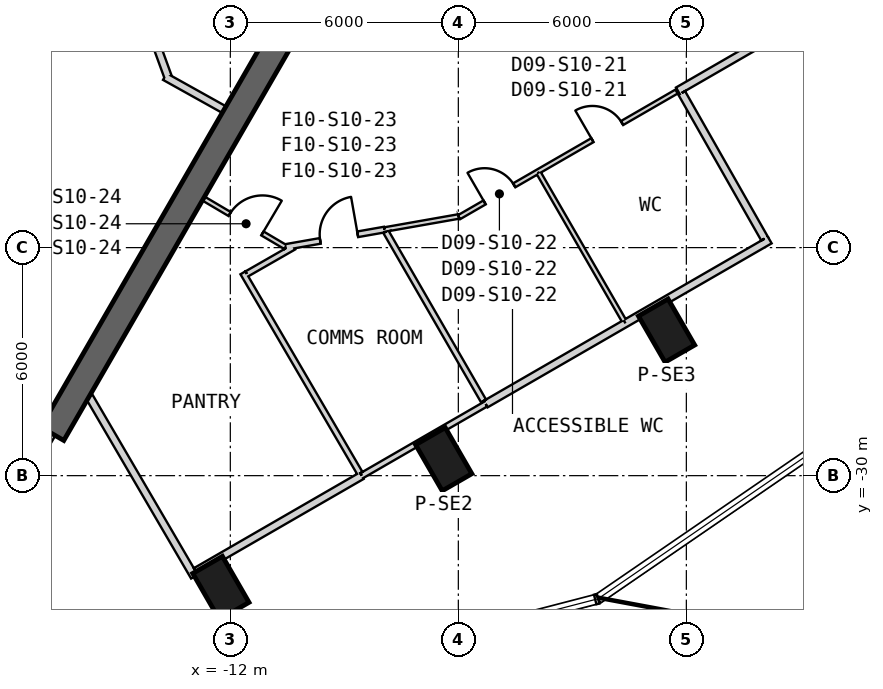
"""IFC4 building model, lengths in metres.
Left out: names, types, materials, properties, quantities, classifications, styles, units other than length and angle.
Written with IfcOpenShell. Run it as: python <this file> out.ifc"""

import sys

from ifc_helpers import new_model, si_unit, direction, frame, frame_2d, origin, origin_2d, place, context, subcontext, project, spatial, rectangle, extrude, element, fill, save


model = new_model("IFC4")
c1 = context("Model", 3, precision=1e-05, world=origin(), true_north=direction((0.0, 1.0)))
c2 = subcontext(c1, "Body", "Model", "MODEL_VIEW")
j1 = project(units=[si_unit("LENGTHUNIT", "METRE"), si_unit("PLANEANGLEUNIT", "RADIAN")], contexts=[c1])
p1 = place(None, origin())
s1 = spatial("IfcSite", under=j1, at=p1, CompositionType="ELEMENT")
p2 = place(p1, origin())
s2 = spatial("IfcBuilding", under=s1, at=p2, CompositionType="ELEMENT")
p3 = place(p2, frame((0.0, 0.0, 181.2)))
s3 = spatial("IfcBuildingStorey", under=s2, at=p3, CompositionType="ELEMENT", Elevation=181.2)
for number, where, z_axis, x_axis in (
    (1, (-12.248, -32.954, 0.0), (0.0, 0.0, 1.0), (0.5, -0.866, 0.0)),
    (2, (-6.384, -29.568, 0.0), (0.0, 0.0, 1.0), (0.5, -0.866, 0.0)),
    (3, (-0.52, -26.183, 0.0), (0.0, 0.0, 1.0), (0.5, -0.866, 0.0)),
):
    element("IfcColumn", number, at=place(p3, frame(where, z_axis=z_axis, x_axis=x_axis)), inside=s3, PredefinedType="COLUMN", context=c2, shape_type="SweptSolid", body=[
        extrude(rectangle(XDim=1.4, YDim=0.9, at=origin_2d()), origin(), (0.0, 0.0, 1.0), 4.0),
    ])
p4 = place(p3, frame((-10.575, -18.316, 0.0), z_axis=(0.0, 0.0, 1.0), x_axis=(-0.500002625756, -0.866023887798, 0.0)))
e4 = element("IfcWall", 4, at=p4, inside=s3, PredefinedType="SHEAR", context=c2, shape_type="SweptSolid", body=[
    extrude(rectangle(XDim=12.22, YDim=0.7, at=frame_2d((6.11, 0.0))), origin(), (0.0, 0.0, 1.0), 4.0),
])
p5 = place(p3, frame((-13.722, -19.499, 0.0), z_axis=(0.0, 0.0, 1.0), x_axis=(0.873381780332, -0.487036205824, 0.0)))
e5 = element("IfcWall", 5, at=p5, inside=s3, PredefinedType="PARTITIONING", context=c2, shape_type="SweptSolid", body=[
    extrude(rectangle(XDim=1.785, YDim=0.2, at=frame_2d((0.892, 0.0))), origin(), (0.0, 0.0, 1.0), 3.7),
])
p6 = place(p3, frame((-14.834, -16.223, 0.0), z_axis=(0.0, 0.0, 1.0), x_axis=(0.342017717312, -0.939693503779, 0.0)))
e6 = element("IfcWall", 6, at=p6, inside=s3, PredefinedType="PARTITIONING", context=c2, shape_type="SweptSolid", body=[
    extrude(rectangle(XDim=3.497, YDim=0.2, at=frame_2d((1.749, 0.0))), origin(), (0.0, 0.0, 1.0), 2.78),
])
p7 = place(p3, frame((-0.223, -19.874, 0.0), z_axis=(0.0, 0.0, 1.0), x_axis=(0.866025366729, 0.500000064182, 0.0)))
e7 = element("IfcWall", 7, at=p7, inside=s3, PredefinedType="PARTITIONING", context=c2, shape_type="SweptSolid", body=[
    extrude(rectangle(XDim=12.18, YDim=0.2, at=frame_2d((6.09, 0.0))), origin(), (0.0, 0.0, 1.0), 2.98),
])
p8 = place(p3, frame((-5.984, -23.2, 0.0), z_axis=(0.0, 0.0, 1.0), x_axis=(0.866017831539, 0.500013115284, 0.0)))
e8 = element("IfcWall", 8, at=p8, inside=s3, PredefinedType="PARTITIONING", context=c2, shape_type="SweptSolid", body=[
    extrude(rectangle(XDim=2.399, YDim=0.12, at=frame_2d((1.2, 0.0))), origin(), (0.0, 0.0, 1.0), 2.88),
])
p9 = place(p8, frame((0.78, 0.0, 0.0)))
e9 = element("IfcOpeningElement", 9, at=p9, cuts=e8, PredefinedType="OPENING", context=c2, shape_type="SweptSolid", body=[
    extrude(rectangle(XDim=0.9, YDim=2.1, at=frame_2d((0.45, 1.05))), frame((0.0, 0.07, 0.0), z_axis=(0.0, -1.0, 0.0), x_axis=(1.0, 0.0, 0.0)), (0.0, 0.0, 1.0), 0.14),
])
p10 = place(p3, frame((-3.906, -22.001, 0.0), z_axis=(0.0, 0.0, 1.0), x_axis=(0.866012851997, 0.500021739704, 0.0)))
e10 = element("IfcWall", 10, at=p10, inside=s3, PredefinedType="PARTITIONING", context=c2, shape_type="SweptSolid", body=[
    extrude(rectangle(XDim=4.213, YDim=0.12, at=frame_2d((2.106, 0.0))), origin(), (0.0, 0.0, 1.0), 2.98),
])
p11 = place(p10, frame((1.656, 0.0, 0.0)))
e11 = element("IfcOpeningElement", 11, at=p11, cuts=e10, PredefinedType="OPENING", context=c2, shape_type="SweptSolid", body=[
    extrude(rectangle(XDim=0.9, YDim=2.1, at=frame_2d((0.45, 1.05))), frame((0.0, 0.07, 0.0), z_axis=(0.0, -1.0, 0.0), x_axis=(1.0, 0.0, 0.0)), (0.0, 0.0, 1.0), 0.14),
])
p12 = place(p3, frame((-7.945, -23.525, 0.0), z_axis=(0.0, 0.0, 1.0), x_axis=(0.984807090041, 0.173651937522, 0.0)))
e12 = element("IfcWall", 12, at=p12, inside=s3, PredefinedType="PARTITIONING", context=c2, shape_type="SweptSolid", body=[
    extrude(rectangle(XDim=1.984, YDim=0.12, at=frame_2d((0.992, 0.0))), origin(), (0.0, 0.0, 1.0), 3.7),
])
p13 = place(p3, frame((-10.55, -23.985, 0.0), z_axis=(0.0, 0.0, 1.0), x_axis=(0.984798421686, 0.173701089936, 0.0)))
e13 = element("IfcWall", 13, at=p13, inside=s3, PredefinedType="PLUMBINGWALL", context=c2, shape_type="SweptSolid", body=[
    extrude(rectangle(XDim=2.645, YDim=0.15, at=frame_2d((1.323, 0.0))), origin(), (0.0, 0.0, 1.0), 2.78),
])
p14 = place(p13, frame((0.93, 0.0, 0.0)))
e14 = element("IfcOpeningElement", 14, at=p14, cuts=e13, PredefinedType="OPENING", context=c2, shape_type="SweptSolid", body=[
    extrude(rectangle(XDim=1.0, YDim=2.1, at=frame_2d((0.5, 1.05))), frame((0.0, 0.085, 0.0), z_axis=(0.0, -1.0, 0.0), x_axis=(1.0, 0.0, 0.0)), (0.0, 0.0, 1.0), 0.17),
])
p15 = place(p3, frame((-12.707, -22.709, 0.0), z_axis=(0.0, 0.0, 1.0), x_axis=(0.860742216303, -0.509041095663, 0.0)))
e15 = element("IfcWall", 15, at=p15, inside=s3, PredefinedType="PARTITIONING", context=c2, shape_type="SweptSolid", body=[
    extrude(rectangle(XDim=2.506, YDim=0.12, at=frame_2d((1.253, 0.0))), origin(), (0.0, 0.0, 1.0), 3.7),
])
p16 = place(p15, frame((0.803, 0.0, 0.0)))
e16 = element("IfcOpeningElement", 16, at=p16, cuts=e15, PredefinedType="OPENING", context=c2, shape_type="SweptSolid", body=[
    extrude(rectangle(XDim=1.0, YDim=2.1, at=frame_2d((0.5, 1.05))), frame((0.0, 0.07, 0.0), z_axis=(0.0, -1.0, 0.0), x_axis=(1.0, 0.0, 0.0)), (0.0, 0.0, 1.0), 0.14),
])
p17 = place(p3, frame((-19.077, -32.983, 0.0), z_axis=(0.0, 0.0, 1.0), x_axis=(0.504095526605, 0.863647902827, 0.0)))
e17 = element("IfcWall", 17, at=p17, inside=s3, PredefinedType="PARTITIONING", context=c2, shape_type="SweptSolid", body=[
    extrude(rectangle(XDim=4.733, YDim=0.2, at=frame_2d((2.366, 0.0))), origin(), (0.0, 0.0, 1.0), 3.27),
])
p18 = place(p3, frame((2.195, -23.802, 0.0), z_axis=(0.0, 0.0, 1.0), x_axis=(-0.866030693553, -0.49999083774, 0.0)))
e18 = element("IfcWall", 18, at=p18, inside=s3, PredefinedType="PARTITIONING", context=c2, shape_type="SweptSolid", body=[
    extrude(rectangle(XDim=4.383, YDim=0.2, at=frame_2d((2.192, 0.0))), origin(), (0.0, 0.0, 1.0), 2.98),
])
p19 = place(p3, frame((-1.601, -25.993, 0.0), z_axis=(0.0, 0.0, 1.0), x_axis=(-0.86603819212, -0.4999778493, 0.0)))
e19 = element("IfcWall", 19, at=p19, inside=s3, PredefinedType="PARTITIONING", context=c2, shape_type="SweptSolid", body=[
    extrude(rectangle(XDim=4.248, YDim=0.2, at=frame_2d((2.124, 0.0))), origin(), (0.0, 0.0, 1.0), 3.7),
])
p20 = place(p3, frame((-8.543, -30.001, 0.0), z_axis=(0.0, 0.0, 1.0), x_axis=(-0.866017018378, -0.500014523669, 0.0)))
e20 = element("IfcWall", 20, at=p20, inside=s3, PredefinedType="PARTITIONING", context=c2, shape_type="SweptSolid", body=[
    extrude(rectangle(XDim=5.041, YDim=0.2, at=frame_2d((2.521, 0.0))), origin(), (0.0, 0.0, 1.0), 2.78),
])
p21 = place(p3, frame((-0.121, -19.931, 0.0), z_axis=(0.0, 0.0, 1.0), x_axis=(0.494319450353, -0.869280323602, 0.0)))
e21 = element("IfcWall", 21, at=p21, inside=s3, PredefinedType="PARTITIONING", context=c2, shape_type="SweptSolid", body=[
    extrude(rectangle(XDim=4.41, YDim=0.2, at=frame_2d((2.205, 0.0))), origin(), (0.0, 0.0, 1.0), 3.7),
])
p22 = place(p3, frame((-5.28, -28.117, 0.0), z_axis=(0.0, 0.0, 1.0), x_axis=(-0.866021579651, -0.500006623535, 0.0)))
e22 = element("IfcWall", 22, at=p22, inside=s3, PredefinedType="PLUMBINGWALL", context=c2, shape_type="SweptSolid", body=[
    extrude(rectangle(XDim=3.768, YDim=0.15, at=frame_2d((1.884, 0.0))), origin(), (0.0, 0.0, 1.0), 2.88),
])
p23 = place(p3, frame((-15.714, -27.918, 0.0), z_axis=(0.0, 0.0, 1.0), x_axis=(0.504506882404, -0.863407670574, 0.0)))
e23 = element("IfcWall", 23, at=p23, inside=s3, PredefinedType="PARTITIONING", context=c2, shape_type="SweptSolid", body=[
    extrude(rectangle(XDim=5.49, YDim=0.2, at=frame_2d((2.745, 0.0))), origin(), (0.0, 0.0, 1.0), 3.7),
])
p24 = place(p3, frame((-1.651, -25.906, 0.0), z_axis=(0.0, 0.0, 1.0), x_axis=(-0.499980495566, 0.866036664382, 0.0)))
e24 = element("IfcWall", 24, at=p24, inside=s3, PredefinedType="PARTITIONING", context=c2, shape_type="SweptSolid", body=[
    extrude(rectangle(XDim=4.45, YDim=0.12, at=frame_2d((2.225, 0.0))), origin(), (0.0, 0.0, 1.0), 3.7),
])
p25 = place(p3, frame((-5.336, -28.034, 0.0), z_axis=(0.0, 0.0, 1.0), x_axis=(-0.499988145349, 0.866032247962, 0.0)))
e25 = element("IfcWall", 25, at=p25, inside=s3, PredefinedType="PLUMBINGWALL", context=c2, shape_type="SweptSolid", body=[
    extrude(rectangle(XDim=5.144, YDim=0.15, at=frame_2d((2.572, 0.0))), origin(), (0.0, 0.0, 1.0), 2.88),
])
p26 = place(p3, frame((-8.588, -29.94, 0.0), z_axis=(0.0, 0.0, 1.0), x_axis=(-0.504258537923, 0.863552735467, 0.0)))
e26 = element("IfcWall", 26, at=p26, inside=s3, PredefinedType="PLUMBINGWALL", context=c2, shape_type="SweptSolid", body=[
    extrude(rectangle(XDim=6.11, YDim=0.15, at=frame_2d((3.055, 0.0))), origin(), (0.0, 0.0, 1.0), 2.78),
])
p27 = place(p3, frame((-10.331, -23.984, 0.0), z_axis=(0.0, 0.0, 1.0), x_axis=(-0.867587682712, -0.49728423744, 0.0)))
e27 = element("IfcWall", 27, at=p27, inside=s3, PredefinedType="PLUMBINGWALL", context=c2, shape_type="SweptSolid", body=[
    extrude(rectangle(XDim=1.423, YDim=0.15, at=frame_2d((0.711, 0.0))), origin(), (0.0, 0.0, 1.0), 3.7),
])
p28 = place(p11, origin())
e28 = element("IfcDoor", 28, at=p28, inside=s3, OperationType="SINGLE_SWING_RIGHT", PredefinedType="NOTDEFINED", context=c2, shape_type="SweptSolid", body=[
    extrude(rectangle(XDim=0.9, YDim=2.1, at=frame_2d((0.45, 1.05))), frame((0.0, 0.025, 0.0), z_axis=(0.0, -1.0, 0.0), x_axis=(1.0, 0.0, 0.0)), (0.0, 0.0, 1.0), 0.05),
])
fill(e11, e28)
p29 = place(p9, origin())
e29 = element("IfcDoor", 29, at=p29, inside=s3, OperationType="SINGLE_SWING_LEFT", PredefinedType="NOTDEFINED", context=c2, shape_type="SweptSolid", body=[
    extrude(rectangle(XDim=0.9, YDim=2.1, at=frame_2d((0.45, 1.05))), frame((0.0, 0.025, 0.0), z_axis=(0.0, -1.0, 0.0), x_axis=(1.0, 0.0, 0.0)), (0.0, 0.0, 1.0), 0.05),
])
fill(e9, e29)
p30 = place(p14, origin())
e30 = element("IfcDoor", 30, at=p30, inside=s3, OperationType="SINGLE_SWING_LEFT", PredefinedType="USERDEFINED", context=c2, shape_type="SweptSolid", body=[
    extrude(rectangle(XDim=1.0, YDim=2.1, at=frame_2d((0.5, 1.05))), frame((0.0, 0.025, 0.0), z_axis=(0.0, -1.0, 0.0), x_axis=(1.0, 0.0, 0.0)), (0.0, 0.0, 1.0), 0.05),
])
fill(e14, e30)
p31 = place(p16, origin())
e31 = element("IfcDoor", 31, at=p31, inside=s3, OperationType="SINGLE_SWING_RIGHT", PredefinedType="NOTDEFINED", context=c2, shape_type="SweptSolid", body=[
    extrude(rectangle(XDim=1.0, YDim=2.1, at=frame_2d((0.5, 1.05))), frame((0.0, 0.025, 0.0), z_axis=(0.0, -1.0, 0.0), x_axis=(1.0, 0.0, 0.0)), (0.0, 0.0, 1.0), 0.05),
])
fill(e16, e31)
save(model, sys.argv[1])
